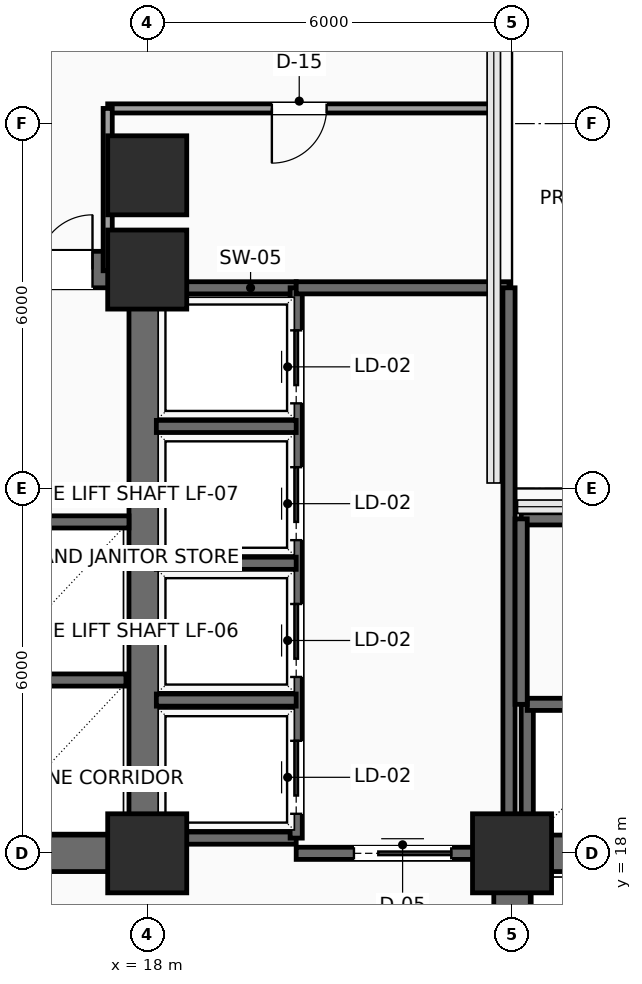
"""IFC4 building model, lengths in metres.
Left out: names, types, materials, properties, quantities, classifications, styles, units other than length and angle.
Written with IfcOpenShell. Run it as: python <this file> out.ifc"""

import sys

from ifc_helpers import new_model, si_unit, direction, frame, frame_2d, origin, origin_2d, place, context, subcontext, project, spatial, rectangle, extrude, element, fill, save


model = new_model("IFC4")
c1 = context("Model", 3, precision=1e-05, world=origin(), true_north=direction((0.0, 1.0)))
c2 = subcontext(c1, "Body", "Model", "MODEL_VIEW")
j1 = project(units=[si_unit("LENGTHUNIT", "METRE"), si_unit("PLANEANGLEUNIT", "RADIAN")], contexts=[c1])
p1 = place(None, origin())
s1 = spatial("IfcSite", under=j1, at=p1, CompositionType="ELEMENT")
p2 = place(p1, origin())
s2 = spatial("IfcBuilding", under=s1, at=p2, CompositionType="ELEMENT")
p3 = place(p2, frame((0.0, 0.0, 40.2)))
s3 = spatial("IfcBuildingStorey", under=s2, at=p3, CompositionType="ELEMENT", Elevation=40.2)
for number, where, z_axis, x_axis in (
    (1, (18.0, 18.0, 0.0), (0.0, 0.0, 1.0), (1.0, 0.0, 0.0)),
    (2, (18.0, 27.6, 0.0), (0.0, 0.0, 1.0), (1.0, 0.0, 0.0)),
    (3, (24.0, 18.0, 0.0), (0.0, 0.0, 1.0), (1.0, 0.0, 0.0)),
    (4, (18.0, 29.15, 0.0), (0.0, 0.0, 1.0), (1.0, 0.0, 0.0)),
):
    element("IfcColumn", number, at=place(p3, frame(where, z_axis=z_axis, x_axis=x_axis)), inside=s3, PredefinedType="COLUMN", context=c2, shape_type="SweptSolid", body=[
        extrude(rectangle(XDim=1.3, YDim=1.3, at=origin_2d()), origin(), (0.0, 0.0, 1.0), 3.9),
    ])
p4 = place(p3, frame((6.0, 18.0, 0.0), z_axis=(0.0, 0.0, 1.0), x_axis=(1.0, 0.0, 0.0)))
e5 = element("IfcWall", 5, at=p4, inside=s3, PredefinedType="SHEAR", context=c2, shape_type="SweptSolid", body=[
    extrude(rectangle(XDim=12.0, YDim=0.6, at=frame_2d((6.0, 0.0))), origin(), (0.0, 0.0, 1.0), 3.65),
])
p5 = place(p4, frame((7.15, 0.0, 0.0)))
e6 = element("IfcOpeningElement", 6, at=p5, cuts=e5, PredefinedType="OPENING", context=c2, shape_type="SweptSolid", body=[
    extrude(rectangle(XDim=1.6, YDim=2.3, at=frame_2d((0.8, 1.15))), frame((0.0, 0.31, 0.0), z_axis=(0.0, -1.0, 0.0), x_axis=(1.0, 0.0, 0.0)), (0.0, 0.0, 1.0), 0.62),
])
p6 = place(p3, frame((6.0, 27.6, 0.0), z_axis=(0.0, 0.0, 1.0), x_axis=(1.0, 0.0, 0.0)))
e7 = element("IfcWall", 7, at=p6, inside=s3, PredefinedType="SHEAR", context=c2, shape_type="SweptSolid", body=[
    extrude(rectangle(XDim=12.0, YDim=0.6, at=frame_2d((6.0, 0.0))), origin(), (0.0, 0.0, 1.0), 3.65),
])
p7 = place(p6, frame((10.2, 0.0, 0.0)))
e8 = element("IfcOpeningElement", 8, at=p7, cuts=e7, PredefinedType="OPENING", context=c2, shape_type="SweptSolid", body=[
    extrude(rectangle(XDim=0.9, YDim=2.15, at=frame_2d((0.45, 1.075))), frame((0.0, 0.31, 0.0), z_axis=(0.0, -1.0, 0.0), x_axis=(1.0, 0.0, 0.0)), (0.0, 0.0, 1.0), 0.62),
])
for number, where, z_axis, x_axis in (
    (9, (18.0, 18.0, 0.0), (0.0, 0.0, 1.0), (0.0, 1.0, 0.0)),
    (10, (24.0, 18.0, 0.0), (0.0, 0.0, 1.0), (1.0, 0.0, 0.0)),
):
    element("IfcWall", number, at=place(p3, frame(where, z_axis=z_axis, x_axis=x_axis)), inside=s3, PredefinedType="SHEAR", context=c2, shape_type="SweptSolid", body=[
        extrude(rectangle(XDim=9.6, YDim=0.6, at=frame_2d((4.8, 0.0))), origin(), (0.0, 0.0, 1.0), 3.65),
    ])
p8 = place(p3, frame((24.0, 6.0, 0.0), z_axis=(0.0, 0.0, 1.0), x_axis=(0.0, 1.0, 0.0)))
e11 = element("IfcWall", 11, at=p8, inside=s3, PredefinedType="SHEAR", context=c2, shape_type="SweptSolid", body=[
    extrude(rectangle(XDim=12.0, YDim=0.6, at=frame_2d((6.0, 0.0))), origin(), (0.0, 0.0, 1.0), 3.65),
])
p9 = place(p8, frame((7.15, 0.0, 0.0)))
e12 = element("IfcOpeningElement", 12, at=p9, cuts=e11, PredefinedType="OPENING", context=c2, shape_type="SweptSolid", body=[
    extrude(rectangle(XDim=1.6, YDim=2.3, at=frame_2d((0.8, 1.15))), frame((0.0, 0.31, 0.0), z_axis=(0.0, -1.0, 0.0), x_axis=(1.0, 0.0, 0.0)), (0.0, 0.0, 1.0), 0.62),
])
p10 = place(p3, frame((15.25, 20.85, 0.0), z_axis=(0.0, 0.0, 1.0), x_axis=(1.0, 0.0, 0.0)))
e13 = element("IfcWall", 13, at=p10, inside=s3, PredefinedType="SHEAR", context=c2, shape_type="SweptSolid", body=[
    extrude(rectangle(XDim=2.4, YDim=0.2, at=frame_2d((1.2, 0.0))), origin(), (0.0, 0.0, 1.0), 3.65),
])
p11 = place(p3, frame((15.25, 23.45, 0.0), z_axis=(0.0, 0.0, 1.0), x_axis=(1.0, 0.0, 0.0)))
e14 = element("IfcWall", 14, at=p11, inside=s3, PredefinedType="SHEAR", context=c2, shape_type="SweptSolid", body=[
    extrude(rectangle(XDim=2.45, YDim=0.2, at=frame_2d((1.225, 0.0))), origin(), (0.0, 0.0, 1.0), 3.65),
])
for number, where, z_axis, x_axis in (
    (15, (18.1, 27.3, 0.0), (0.0, 0.0, 1.0), (1.0, 0.0, 0.0)),
    (16, (18.1, 18.25, 0.0), (0.0, 0.0, 1.0), (1.0, 0.0, 0.0)),
):
    element("IfcWall", number, at=place(p3, frame(where, z_axis=z_axis, x_axis=x_axis)), inside=s3, PredefinedType="SHEAR", context=c2, shape_type="SweptSolid", body=[
        extrude(rectangle(XDim=2.35, YDim=0.2, at=frame_2d((1.175, 0.0))), origin(), (0.0, 0.0, 1.0), 3.65),
    ])
p12 = place(p3, frame((20.45, 18.25, 0.0), z_axis=(0.0, 0.0, 1.0), x_axis=(0.0, 1.0, 0.0)))
e17 = element("IfcWall", 17, at=p12, inside=s3, PredefinedType="SHEAR", context=c2, shape_type="SweptSolid", body=[
    extrude(rectangle(XDim=9.05, YDim=0.2, at=frame_2d((4.525, 0.0))), origin(), (0.0, 0.0, 1.0), 3.65),
])
p13 = place(p12, frame((0.4, 0.0, 0.0)))
e18 = element("IfcOpeningElement", 18, at=p13, cuts=e17, PredefinedType="OPENING", context=c2, shape_type="SweptSolid", body=[
    extrude(rectangle(XDim=1.2, YDim=2.2, at=frame_2d((0.6, 1.1))), frame((0.0, 0.11, 0.0), z_axis=(0.0, -1.0, 0.0), x_axis=(1.0, 0.0, 0.0)), (0.0, 0.0, 1.0), 0.22),
])
p14 = place(p12, frame((2.65, 0.0, 0.0)))
e19 = element("IfcOpeningElement", 19, at=p14, cuts=e17, PredefinedType="OPENING", context=c2, shape_type="SweptSolid", body=[
    extrude(rectangle(XDim=1.2, YDim=2.2, at=frame_2d((0.6, 1.1))), frame((0.0, 0.11, 0.0), z_axis=(0.0, -1.0, 0.0), x_axis=(1.0, 0.0, 0.0)), (0.0, 0.0, 1.0), 0.22),
])
p15 = place(p12, frame((4.9, 0.0, 0.0)))
e20 = element("IfcOpeningElement", 20, at=p15, cuts=e17, PredefinedType="OPENING", context=c2, shape_type="SweptSolid", body=[
    extrude(rectangle(XDim=1.2, YDim=2.2, at=frame_2d((0.6, 1.1))), frame((0.0, 0.11, 0.0), z_axis=(0.0, -1.0, 0.0), x_axis=(1.0, 0.0, 0.0)), (0.0, 0.0, 1.0), 0.22),
])
p16 = place(p12, frame((7.15, 0.0, 0.0)))
e21 = element("IfcOpeningElement", 21, at=p16, cuts=e17, PredefinedType="OPENING", context=c2, shape_type="SweptSolid", body=[
    extrude(rectangle(XDim=1.2, YDim=2.2, at=frame_2d((0.6, 1.1))), frame((0.0, 0.11, 0.0), z_axis=(0.0, -1.0, 0.0), x_axis=(1.0, 0.0, 0.0)), (0.0, 0.0, 1.0), 0.22),
])
for number, where, z_axis, x_axis in (
    (22, (18.15, 20.52, 0.0), (0.0, 0.0, 1.0), (1.0, 0.0, 0.0)),
    (23, (18.15, 22.77, 0.0), (0.0, 0.0, 1.0), (1.0, 0.0, 0.0)),
    (24, (18.15, 25.02, 0.0), (0.0, 0.0, 1.0), (1.0, 0.0, 0.0)),
):
    element("IfcWall", number, at=place(p3, frame(where, z_axis=z_axis, x_axis=x_axis)), inside=s3, PredefinedType="SHEAR", context=c2, shape_type="SweptSolid", body=[
        extrude(rectangle(XDim=2.3, YDim=0.2, at=frame_2d((1.15, 0.0))), origin(), (0.0, 0.0, 1.0), 3.65),
    ])
p17 = place(p3, frame((20.45, 18.0, 0.0), z_axis=(0.0, 0.0, 1.0), x_axis=(1.0, 0.0, 0.0)))
e25 = element("IfcWall", 25, at=p17, inside=s3, PredefinedType="SHEAR", context=c2, shape_type="SweptSolid", body=[
    extrude(rectangle(XDim=3.5, YDim=0.2, at=frame_2d((1.75, 0.0))), origin(), (0.0, 0.0, 1.0), 3.65),
])
p18 = place(p17, frame((0.95, 0.0, 0.0)))
e26 = element("IfcOpeningElement", 26, at=p18, cuts=e25, PredefinedType="OPENING", context=c2, shape_type="SweptSolid", body=[
    extrude(rectangle(XDim=1.6, YDim=2.3, at=frame_2d((0.8, 1.15))), frame((0.0, 0.11, 0.0), z_axis=(0.0, -1.0, 0.0), x_axis=(1.0, 0.0, 0.0)), (0.0, 0.0, 1.0), 0.22),
])
p19 = place(p3, frame((20.45, 27.3, 0.0), z_axis=(0.0, 0.0, 1.0), x_axis=(1.0, 0.0, 0.0)))
e27 = element("IfcWall", 27, at=p19, inside=s3, PredefinedType="SHEAR", context=c2, shape_type="SweptSolid", body=[
    extrude(rectangle(XDim=3.5, YDim=0.2, at=frame_2d((1.75, 0.0))), origin(), (0.0, 0.0, 1.0), 3.65),
])
p20 = place(p3, frame((23.95, 18.0, 0.0), z_axis=(0.0, 0.0, 1.0), x_axis=(0.0, 1.0, 0.0)))
e28 = element("IfcWall", 28, at=p20, inside=s3, PredefinedType="SHEAR", context=c2, shape_type="SweptSolid", body=[
    extrude(rectangle(XDim=9.3, YDim=0.2, at=frame_2d((4.65, 0.0))), origin(), (0.0, 0.0, 1.0), 3.65),
])
p21 = place(p3, frame((24.25, 18.1, 0.0), z_axis=(0.0, 0.0, 1.0), x_axis=(0.0, 1.0, 0.0)))
e29 = element("IfcWall", 29, at=p21, inside=s3, PredefinedType="SHEAR", context=c2, shape_type="SweptSolid", body=[
    extrude(rectangle(XDim=2.35, YDim=0.2, at=frame_2d((1.175, 0.0))), origin(), (0.0, 0.0, 1.0), 3.65),
])
p22 = place(p3, frame((24.25, 20.45, 0.0), z_axis=(0.0, 0.0, 1.0), x_axis=(1.0, 0.0, 0.0)))
e30 = element("IfcWall", 30, at=p22, inside=s3, PredefinedType="SHEAR", context=c2, shape_type="SweptSolid", body=[
    extrude(rectangle(XDim=9.05, YDim=0.2, at=frame_2d((4.525, 0.0))), origin(), (0.0, 0.0, 1.0), 3.65),
])
p23 = place(p3, frame((24.15, 23.5, 0.0), z_axis=(0.0, 0.0, 1.0), x_axis=(1.0, 0.0, 0.0)))
e31 = element("IfcWall", 31, at=p23, inside=s3, PredefinedType="SHEAR", context=c2, shape_type="SweptSolid", body=[
    extrude(rectangle(XDim=9.15, YDim=0.2, at=frame_2d((4.575, 0.0))), origin(), (0.0, 0.0, 1.0), 3.65),
])
p24 = place(p3, frame((24.15, 20.45, 0.0), z_axis=(0.0, 0.0, 1.0), x_axis=(0.0, 1.0, 0.0)))
e32 = element("IfcWall", 32, at=p24, inside=s3, PredefinedType="SHEAR", context=c2, shape_type="SweptSolid", body=[
    extrude(rectangle(XDim=3.05, YDim=0.2, at=frame_2d((1.525, 0.0))), origin(), (0.0, 0.0, 1.0), 3.65),
])
p25 = place(p3, frame((23.7, 30.25, 0.0), z_axis=(0.0, 0.0, 1.0), x_axis=(-1.0, 0.0, 0.0)))
e33 = element("IfcWall", 33, at=p25, inside=s3, PredefinedType="PARTITIONING", context=c2, shape_type="SweptSolid", body=[
    extrude(rectangle(XDim=6.35, YDim=0.15, at=frame_2d((3.175, 0.0))), origin(), (0.0, 0.0, 1.0), 3.65),
])
p26 = place(p25, frame((2.75, 0.0, 0.0)))
e34 = element("IfcOpeningElement", 34, at=p26, cuts=e33, PredefinedType="OPENING", context=c2, shape_type="SweptSolid", body=[
    extrude(rectangle(XDim=0.9, YDim=2.1, at=frame_2d((0.45, 1.05))), frame((0.0, 0.085, 0.0), z_axis=(0.0, -1.0, 0.0), x_axis=(1.0, 0.0, 0.0)), (0.0, 0.0, 1.0), 0.17),
])
p27 = place(p3, frame((17.35, 30.25, 0.0), z_axis=(0.0, 0.0, 1.0), x_axis=(0.0, -1.0, 0.0)))
e35 = element("IfcWall", 35, at=p27, inside=s3, PredefinedType="PARTITIONING", context=c2, shape_type="SweptSolid", body=[
    extrude(rectangle(XDim=2.67, YDim=0.15, at=frame_2d((1.335, 0.0))), origin(), (0.0, 0.0, 1.0), 3.65),
])
p28 = place(p7, origin())
e36 = element("IfcDoor", 36, at=p28, inside=s3, OperationType="SINGLE_SWING_RIGHT", PredefinedType="DOOR", context=c2, shape_type="SweptSolid", body=[
    extrude(rectangle(XDim=0.9, YDim=2.15, at=frame_2d((0.45, 1.075))), frame((0.0, 0.025, 0.0), z_axis=(0.0, -1.0, 0.0), x_axis=(1.0, 0.0, 0.0)), (0.0, 0.0, 1.0), 0.05),
])
fill(e8, e36)
p29 = place(p13, origin())
e37 = element("IfcDoor", 37, at=p29, inside=s3, OperationType="SLIDING_TO_RIGHT", PredefinedType="DOOR", context=c2, shape_type="SweptSolid", body=[
    extrude(rectangle(XDim=1.2, YDim=2.2, at=frame_2d((0.6, 1.1))), frame((0.0, 0.025, 0.0), z_axis=(0.0, -1.0, 0.0), x_axis=(1.0, 0.0, 0.0)), (0.0, 0.0, 1.0), 0.05),
])
fill(e18, e37)
p30 = place(p14, origin())
e38 = element("IfcDoor", 38, at=p30, inside=s3, OperationType="SLIDING_TO_RIGHT", PredefinedType="DOOR", context=c2, shape_type="SweptSolid", body=[
    extrude(rectangle(XDim=1.2, YDim=2.2, at=frame_2d((0.6, 1.1))), frame((0.0, 0.025, 0.0), z_axis=(0.0, -1.0, 0.0), x_axis=(1.0, 0.0, 0.0)), (0.0, 0.0, 1.0), 0.05),
])
fill(e19, e38)
p31 = place(p15, origin())
e39 = element("IfcDoor", 39, at=p31, inside=s3, OperationType="SLIDING_TO_RIGHT", PredefinedType="DOOR", context=c2, shape_type="SweptSolid", body=[
    extrude(rectangle(XDim=1.2, YDim=2.2, at=frame_2d((0.6, 1.1))), frame((0.0, 0.025, 0.0), z_axis=(0.0, -1.0, 0.0), x_axis=(1.0, 0.0, 0.0)), (0.0, 0.0, 1.0), 0.05),
])
fill(e20, e39)
p32 = place(p16, origin())
e40 = element("IfcDoor", 40, at=p32, inside=s3, OperationType="SLIDING_TO_RIGHT", PredefinedType="DOOR", context=c2, shape_type="SweptSolid", body=[
    extrude(rectangle(XDim=1.2, YDim=2.2, at=frame_2d((0.6, 1.1))), frame((0.0, 0.025, 0.0), z_axis=(0.0, -1.0, 0.0), x_axis=(1.0, 0.0, 0.0)), (0.0, 0.0, 1.0), 0.05),
])
fill(e21, e40)
p33 = place(p18, origin())
e41 = element("IfcDoor", 41, at=p33, inside=s3, OperationType="DOUBLE_DOOR_SLIDING", PredefinedType="DOOR", context=c2, shape_type="SweptSolid", body=[
    extrude(rectangle(XDim=1.6, YDim=2.3, at=frame_2d((0.8, 1.15))), frame((0.0, 0.025, 0.0), z_axis=(0.0, -1.0, 0.0), x_axis=(1.0, 0.0, 0.0)), (0.0, 0.0, 1.0), 0.05),
])
fill(e26, e41)
p34 = place(p26, origin())
e42 = element("IfcDoor", 42, at=p34, inside=s3, OperationType="SINGLE_SWING_RIGHT", PredefinedType="DOOR", context=c2, shape_type="SweptSolid", body=[
    extrude(rectangle(XDim=0.9, YDim=2.1, at=frame_2d((0.45, 1.05))), frame((0.0, 0.025, 0.0), z_axis=(0.0, -1.0, 0.0), x_axis=(1.0, 0.0, 0.0)), (0.0, 0.0, 1.0), 0.05),
])
fill(e34, e42)
save(model, sys.argv[1])
